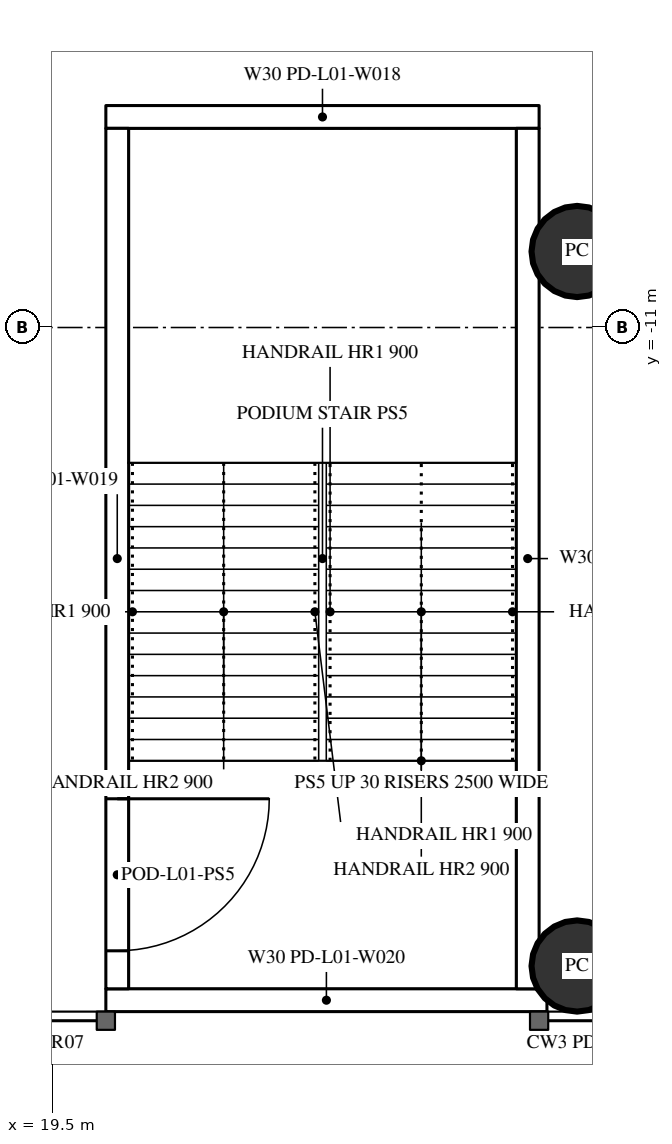
"""IFC4 building model, lengths in metres.
Left out: names, types, materials, properties, quantities, classifications, styles, units other than length and angle.
Written with IfcOpenShell. Run it as: python <this file> out.ifc"""

import sys

from ifc_helpers import new_model, si_unit, direction, frame, frame_2d, origin, origin_2d, place, context, subcontext, project, spatial, rectangle, circle, extrude, element, fill, save


model = new_model("IFC4")
c1 = context("Model", 3, precision=1e-05, world=origin(), true_north=direction((0.0, 1.0)))
c2 = subcontext(c1, "Body", "Model", "MODEL_VIEW")
j1 = project(units=[si_unit("LENGTHUNIT", "METRE"), si_unit("PLANEANGLEUNIT", "RADIAN")], contexts=[c1])
p1 = place(None, origin())
s1 = spatial("IfcSite", under=j1, at=p1, CompositionType="ELEMENT")
p2 = place(p1, origin())
s2 = spatial("IfcBuilding", under=s1, at=p2, CompositionType="ELEMENT")
p3 = place(p2, frame((0.0, 0.0, 7.2)))
s3 = spatial("IfcBuildingStorey", under=s2, at=p3, CompositionType="ELEMENT", Elevation=7.2)
for number, where, z_axis, x_axis in (
    (1, (26.4, -19.4, 0.0), (0.0, 0.0, 1.0), (1.0, 0.0, 0.0)),
    (2, (26.4, -10.0, 0.0), (0.0, 0.0, 1.0), (1.0, 0.0, 0.0)),
):
    element("IfcColumn", number, at=place(p3, frame(where, z_axis=z_axis, x_axis=x_axis)), inside=s3, PredefinedType="COLUMN", context=c2, shape_type="SweptSolid", body=[
        extrude(circle(Radius=0.6, at=origin_2d()), origin(), (0.0, 0.0, 1.0), 5.4),
    ])
p4 = place(p3, frame((26.003, -19.85, 0.0), z_axis=(0.0, 0.0, 1.0), x_axis=(-1.0, 0.0, 0.0)))
e3 = element("IfcWall", 3, at=p4, inside=s3, PredefinedType="SOLIDWALL", context=c2, shape_type="SweptSolid", body=[
    extrude(rectangle(XDim=5.803, YDim=0.3, at=frame_2d((2.902, 0.0))), origin(), (0.0, 0.0, 1.0), 3.55),
])
p5 = place(p3, frame((20.2, -8.23, 0.0), z_axis=(0.0, 0.0, 1.0), x_axis=(1.0, 0.0, 0.0)))
e4 = element("IfcWall", 4, at=p5, inside=s3, PredefinedType="SOLIDWALL", context=c2, shape_type="SweptSolid", body=[
    extrude(rectangle(XDim=5.7, YDim=0.3, at=frame_2d((2.85, 0.0))), origin(), (0.0, 0.0, 1.0), 5.05),
])
p6 = place(p3, frame((20.35, -8.38, 0.0), z_axis=(0.0, 0.0, 1.0), x_axis=(0.0, -1.0, 0.0)))
e5 = element("IfcWall", 5, at=p6, inside=s3, PredefinedType="SOLIDWALL", context=c2, shape_type="SweptSolid", body=[
    extrude(rectangle(XDim=11.32, YDim=0.3, at=frame_2d((5.66, 0.0))), origin(), (0.0, 0.0, 1.0), 5.05),
])
p7 = place(p6, frame((8.82, 0.0, 0.0)))
e6 = element("IfcOpeningElement", 6, at=p7, cuts=e5, PredefinedType="OPENING", context=c2, shape_type="SweptSolid", body=[
    extrude(rectangle(XDim=2.0, YDim=2.2, at=frame_2d((1.0, 1.1))), frame((0.0, 0.16, 0.0), z_axis=(0.0, -1.0, 0.0), x_axis=(1.0, 0.0, 0.0)), (0.0, 0.0, 1.0), 0.32),
])
p8 = place(p3, frame((25.75, -8.38, 0.0), z_axis=(0.0, 0.0, 1.0), x_axis=(0.0, -1.0, 0.0)))
e7 = element("IfcWall", 7, at=p8, inside=s3, PredefinedType="SOLIDWALL", context=c2, shape_type="SweptSolid", body=[
    extrude(rectangle(XDim=11.32, YDim=0.3, at=frame_2d((5.66, 0.0))), origin(), (0.0, 0.0, 1.0), 5.05),
])
p9 = place(p7, origin())
e8 = element("IfcDoor", 8, at=p9, inside=s3, OperationType="DOUBLE_DOOR_SINGLE_SWING", PredefinedType="DOOR", context=c2, shape_type="SweptSolid", body=[
    extrude(rectangle(XDim=2.0, YDim=2.2, at=frame_2d((1.0, 1.1))), frame((0.0, 0.025, 0.0), z_axis=(0.0, -1.0, 0.0), x_axis=(1.0, 0.0, 0.0)), (0.0, 0.0, 1.0), 0.05),
])
fill(e6, e8)
save(model, sys.argv[1])
